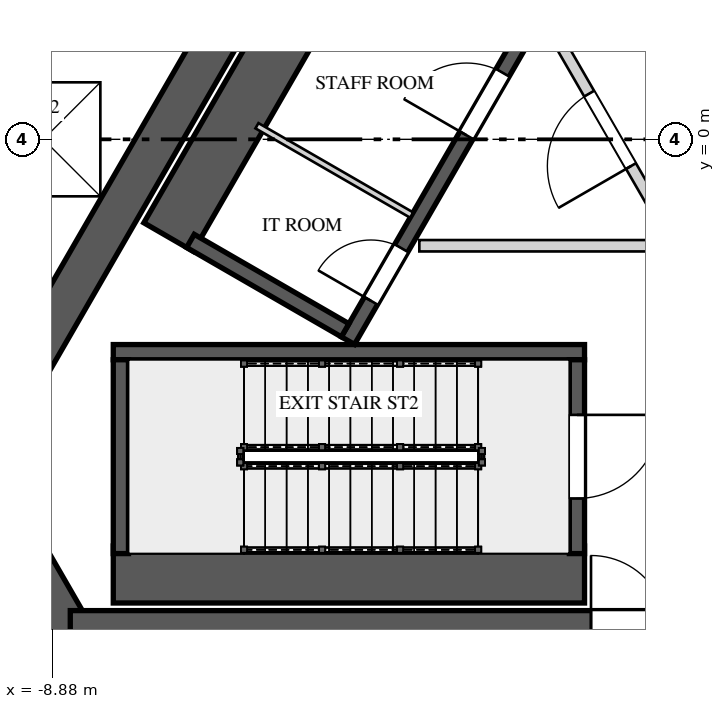
"""IFC4 building model, lengths in metres.
Left out: names, types, materials, properties, quantities, classifications, styles, units other than length and angle.
Written with IfcOpenShell. Run it as: python <this file> out.ifc"""

import sys

from ifc_helpers import new_model, si_unit, direction, frame, frame_2d, origin, origin_2d, place, context, subcontext, project, spatial, rectangle, extrude, element, fill, save


model = new_model("IFC4")
c1 = context("Model", 3, precision=1e-05, world=origin(), true_north=direction((0.0, 1.0)))
c2 = subcontext(c1, "Body", "Model", "MODEL_VIEW")
j1 = project(units=[si_unit("LENGTHUNIT", "METRE"), si_unit("PLANEANGLEUNIT", "RADIAN")], contexts=[c1])
p1 = place(None, origin())
s1 = spatial("IfcSite", under=j1, at=p1, CompositionType="ELEMENT")
p2 = place(p1, origin())
s2 = spatial("IfcBuilding", under=s1, at=p2, CompositionType="ELEMENT")
p3 = place(p2, frame((0.0, 0.0, 380.9)))
s3 = spatial("IfcBuildingStorey", under=s2, at=p3, CompositionType="ELEMENT", Elevation=380.9)
p4 = place(p3, frame((-1.285, 10.725, 0.0), z_axis=(0.0, 0.0, 1.0), x_axis=(-0.499994590896, -0.86602852671, 0.0)))
e1 = element("IfcWall", 1, at=p4, inside=s3, PredefinedType="SHEAR", context=c2, shape_type="SweptSolid", body=[
    extrude(rectangle(XDim=17.292, YDim=0.55, at=frame_2d((8.646, 0.0))), origin(), (0.0, 0.0, 1.0), 11.65),
])
p5 = place(p4, frame((6.851, 0.0, 0.0)))
e2 = element("IfcOpeningElement", 2, at=p5, cuts=e1, PredefinedType="OPENING", context=c2, shape_type="SweptSolid", body=[
    extrude(rectangle(XDim=1.0, YDim=2.4, at=frame_2d((0.5, 1.2))), frame((0.0, 0.285, 0.0), z_axis=(0.0, -1.0, 0.0), x_axis=(1.0, 0.0, 0.0)), (0.0, 0.0, 1.0), 0.57),
])
p6 = place(p3, frame((-10.01, -4.113, 0.0), z_axis=(0.0, 0.0, 1.0), x_axis=(0.499995765644, -0.866027848477, 0.0)))
e3 = element("IfcWall", 3, at=p6, inside=s3, PredefinedType="SHEAR", context=c2, shape_type="SweptSolid", body=[
    extrude(rectangle(XDim=2.887, YDim=0.55, at=frame_2d((1.443, 0.0))), origin(), (0.0, 0.0, 1.0), 11.65),
])
p7 = place(p3, frame((-8.646, -6.475, 0.0), z_axis=(0.0, 0.0, 1.0), x_axis=(1.0, 0.0, 0.0)))
e4 = element("IfcWall", 4, at=p7, inside=s3, PredefinedType="SHEAR", context=c2, shape_type="SweptSolid", body=[
    extrude(rectangle(XDim=17.292, YDim=0.55, at=frame_2d((8.646, 0.0))), origin(), (0.0, 0.0, 1.0), 11.65),
])
p8 = place(p7, frame((6.851, 0.0, 0.0)))
e5 = element("IfcOpeningElement", 5, at=p8, cuts=e4, PredefinedType="OPENING", context=c2, shape_type="SweptSolid", body=[
    extrude(rectangle(XDim=1.0, YDim=2.4, at=frame_2d((0.5, 1.2))), frame((0.0, 0.285, 0.0), z_axis=(0.0, -1.0, 0.0), x_axis=(1.0, 0.0, 0.0)), (0.0, 0.0, 1.0), 0.57),
])
p9 = place(p7, frame((15.089, 0.0, 0.0)))
e6 = element("IfcOpeningElement", 6, at=p9, cuts=e4, PredefinedType="OPENING", context=c2, shape_type="SweptSolid", body=[
    extrude(rectangle(XDim=0.8, YDim=2.1, at=frame_2d((0.4, 1.05))), frame((0.0, 0.285, 0.0), z_axis=(0.0, -1.0, 0.0), x_axis=(1.0, 0.0, 0.0)), (0.0, 0.0, 1.0), 0.57),
])
p10 = place(p3, frame((-24.801, 5.463, 0.0), z_axis=(0.0, 0.0, 1.0), x_axis=(0.669133322061, -0.74314238024, 0.0)))
e7 = element("IfcWall", 7, at=p10, inside=s3, PredefinedType="PARAPET", context=c2, shape_type="SweptSolid", body=[
    extrude(rectangle(XDim=41.439, YDim=0.45, at=frame_2d((20.72, 0.0))), origin(), (0.0, 0.0, 1.0), 1.2),
])
p11 = place(p3, frame((-8.08, -5.725, 0.0), z_axis=(0.0, 0.0, 1.0), x_axis=(1.0, 0.0, 0.0)))
e8 = element("IfcWall", 8, at=p11, inside=s3, PredefinedType="SOLIDWALL", context=c2, shape_type="SweptSolid", body=[
    extrude(rectangle(XDim=6.2, YDim=0.75, at=frame_2d((3.1, 0.0))), origin(), (0.0, 0.0, 1.0), 11.65),
])
p12 = place(p3, frame((-8.08, -2.8, 0.0), z_axis=(0.0, 0.0, 1.0), x_axis=(1.0, 0.0, 0.0)))
e9 = element("IfcWall", 9, at=p12, inside=s3, PredefinedType="SOLIDWALL", context=c2, shape_type="SweptSolid", body=[
    extrude(rectangle(XDim=6.2, YDim=0.2, at=frame_2d((3.1, 0.0))), origin(), (0.0, 0.0, 1.0), 11.65),
])
p13 = place(p3, frame((-7.98, -2.9, 0.0), z_axis=(0.0, 0.0, 1.0), x_axis=(0.0, -1.0, 0.0)))
e10 = element("IfcWall", 10, at=p13, inside=s3, PredefinedType="SOLIDWALL", context=c2, shape_type="SweptSolid", body=[
    extrude(rectangle(XDim=2.55, YDim=0.2, at=frame_2d((1.275, 0.0))), origin(), (0.0, 0.0, 1.0), 11.65),
])
p14 = place(p3, frame((-1.98, -2.9, 0.0), z_axis=(0.0, 0.0, 1.0), x_axis=(0.0, -1.0, 0.0)))
e11 = element("IfcWall", 11, at=p14, inside=s3, PredefinedType="SOLIDWALL", context=c2, shape_type="SweptSolid", body=[
    extrude(rectangle(XDim=2.55, YDim=0.2, at=frame_2d((1.275, 0.0))), origin(), (0.0, 0.0, 1.0), 11.65),
])
p15 = place(p14, frame((0.725, 0.0, 0.0)))
e12 = element("IfcOpeningElement", 12, at=p15, cuts=e11, PredefinedType="OPENING", context=c2, shape_type="SweptSolid", body=[
    extrude(rectangle(XDim=1.1, YDim=2.4, at=frame_2d((0.55, 1.2))), frame((0.0, 0.11, 0.0), z_axis=(0.0, -1.0, 0.0), x_axis=(1.0, 0.0, 0.0)), (0.0, 0.0, 1.0), 0.22),
])
p16 = place(p3, frame((-4.993, -2.648, 0.0), z_axis=(0.0, 0.0, 1.0), x_axis=(0.499996545922, 0.866027397988, 0.0)))
e13 = element("IfcWall", 13, at=p16, inside=s3, PredefinedType="SOLIDWALL", context=c2, shape_type="SweptSolid", body=[
    extrude(rectangle(XDim=5.5, YDim=0.2, at=frame_2d((2.75, 0.0))), origin(), (0.0, 0.0, 1.0), 11.65),
])
p17 = place(p16, frame((3.12, 0.0, 0.0)))
e14 = element("IfcOpeningElement", 14, at=p17, cuts=e13, PredefinedType="OPENING", context=c2, shape_type="SweptSolid", body=[
    extrude(rectangle(XDim=0.95, YDim=2.4, at=frame_2d((0.475, 1.2))), frame((0.0, 0.11, 0.0), z_axis=(0.0, -1.0, 0.0), x_axis=(1.0, 0.0, 0.0)), (0.0, 0.0, 1.0), 0.22),
])
p18 = place(p16, frame((0.605, 0.0, 0.0)))
e15 = element("IfcOpeningElement", 15, at=p18, cuts=e13, PredefinedType="OPENING", context=c2, shape_type="SweptSolid", body=[
    extrude(rectangle(XDim=0.8, YDim=2.1, at=frame_2d((0.4, 1.05))), frame((0.0, 0.11, 0.0), z_axis=(0.0, -1.0, 0.0), x_axis=(1.0, 0.0, 0.0)), (0.0, 0.0, 1.0), 0.22),
])
p19 = place(p3, frame((-4.603, 3.477, 0.0), z_axis=(0.0, 0.0, 1.0), x_axis=(-0.500015767406, -0.866016300277, 0.0)))
e16 = element("IfcWall", 16, at=p19, inside=s3, PredefinedType="SOLIDWALL", context=c2, shape_type="SweptSolid", body=[
    extrude(rectangle(XDim=5.5, YDim=0.75, at=frame_2d((2.75, 0.0))), origin(), (0.0, 0.0, 1.0), 11.65),
])
p20 = place(p3, frame((-5.03, -2.512, 0.0), z_axis=(0.0, 0.0, 1.0), x_axis=(-0.866016039709, 0.500016218704, 0.0)))
e17 = element("IfcWall", 17, at=p20, inside=s3, PredefinedType="SOLIDWALL", context=c2, shape_type="SweptSolid", body=[
    extrude(rectangle(XDim=2.35, YDim=0.2, at=frame_2d((1.175, 0.0))), origin(), (0.0, 0.0, 1.0), 11.65),
])
p21 = place(p3, frame((-4.155, -0.996, 0.0), z_axis=(0.0, 0.0, 1.0), x_axis=(-0.866016039709, 0.500016218704, 0.0)))
e18 = element("IfcWall", 18, at=p21, inside=s3, PredefinedType="PARTITIONING", context=c2, shape_type="SweptSolid", body=[
    extrude(rectangle(XDim=2.35, YDim=0.08, at=frame_2d((1.175, 0.0))), origin(), (0.0, 0.0, 1.0), 11.65),
])
p22 = place(p3, frame((-0.744, -1.261, 0.0), z_axis=(0.0, 0.0, 1.0), x_axis=(-0.500004234368, 0.866022959057, 0.0)))
e19 = element("IfcWall", 19, at=p22, inside=s3, PredefinedType="PARTITIONING", context=c2, shape_type="SweptSolid", body=[
    extrude(rectangle(XDim=3.125, YDim=0.15, at=frame_2d((1.562, 0.0))), origin(), (0.0, 0.0, 1.0), 11.65),
])
p23 = place(p22, frame((1.05, 0.0, 0.0)))
e20 = element("IfcOpeningElement", 20, at=p23, cuts=e19, PredefinedType="OPENING", context=c2, shape_type="SweptSolid", body=[
    extrude(rectangle(XDim=1.1, YDim=2.4, at=frame_2d((0.55, 1.2))), frame((0.0, 0.085, 0.0), z_axis=(0.0, -1.0, 0.0), x_axis=(1.0, 0.0, 0.0)), (0.0, 0.0, 1.0), 0.17),
])
p24 = place(p3, frame((-4.053, -1.4, 0.0), z_axis=(0.0, 0.0, 1.0), x_axis=(1.0, 0.0, 0.0)))
e21 = element("IfcWall", 21, at=p24, inside=s3, PredefinedType="PARTITIONING", context=c2, shape_type="SweptSolid", body=[
    extrude(rectangle(XDim=7.876, YDim=0.15, at=frame_2d((3.938, 0.0))), origin(), (0.0, 0.0, 1.0), 11.65),
])
p25 = place(p2, frame((0.0, 0.0, 392.9)))
p26 = place(p25, frame((-1.23, -2.9, 0.0), z_axis=(0.0, 0.0, 1.0), x_axis=(0.0, -1.0, 0.0)))
p27 = place(p26, frame((0.675, 0.0, 0.0)))
p28 = place(p27, origin())
e22 = element("IfcDoor", 22, at=p28, inside=s3, OperationType="DOUBLE_DOOR_SINGLE_SWING", PredefinedType="DOOR", context=c2, shape_type="SweptSolid", body=[
    extrude(rectangle(XDim=1.2, YDim=2.1, at=frame_2d((0.6, 1.05))), frame((0.0, 0.025, 0.0), z_axis=(0.0, -1.0, 0.0), x_axis=(1.0, 0.0, 0.0)), (0.0, 0.0, 1.0), 0.05),
])
p29 = place(p25, frame((0.0, 0.0, -0.35)))
p30 = place(p29, frame((-9.0, 0.0, 0.0)))
p31 = place(p30, frame((0.0, 0.0, 0.3)))
e23 = element("IfcWindow", 23, at=p31, inside=s3, PartitioningType="SINGLE_PANEL", PredefinedType="SKYLIGHT", context=c2, shape_type="SweptSolid", body=[
    extrude(rectangle(XDim=1.5, YDim=1.5, at=origin_2d()), origin(), (0.0, 0.0, 1.0), 0.05),
])
p32 = place(p15, origin())
e24 = element("IfcDoor", 24, at=p32, inside=s3, OperationType="SINGLE_SWING_LEFT", PredefinedType="DOOR", context=c2, shape_type="SweptSolid", body=[
    extrude(rectangle(XDim=1.1, YDim=2.4, at=frame_2d((0.55, 1.2))), frame((0.0, 0.025, 0.0), z_axis=(0.0, -1.0, 0.0), x_axis=(1.0, 0.0, 0.0)), (0.0, 0.0, 1.0), 0.05),
])
fill(e12, e24)
p33 = place(p17, origin())
e25 = element("IfcDoor", 25, at=p33, inside=s3, OperationType="SINGLE_SWING_LEFT", PredefinedType="DOOR", context=c2, shape_type="SweptSolid", body=[
    extrude(rectangle(XDim=0.95, YDim=2.4, at=frame_2d((0.475, 1.2))), frame((0.0, 0.025, 0.0), z_axis=(0.0, -1.0, 0.0), x_axis=(1.0, 0.0, 0.0)), (0.0, 0.0, 1.0), 0.05),
])
fill(e14, e25)
p34 = place(p18, origin())
e26 = element("IfcDoor", 26, at=p34, inside=s3, OperationType="SINGLE_SWING_RIGHT", PredefinedType="DOOR", context=c2, shape_type="SweptSolid", body=[
    extrude(rectangle(XDim=0.8, YDim=2.1, at=frame_2d((0.4, 1.05))), frame((0.0, 0.025, 0.0), z_axis=(0.0, -1.0, 0.0), x_axis=(1.0, 0.0, 0.0)), (0.0, 0.0, 1.0), 0.05),
])
fill(e15, e26)
p35 = place(p23, origin())
e27 = element("IfcDoor", 27, at=p35, inside=s3, OperationType="SINGLE_SWING_LEFT", PredefinedType="DOOR", context=c2, shape_type="SweptSolid", body=[
    extrude(rectangle(XDim=1.1, YDim=2.4, at=frame_2d((0.55, 1.2))), frame((0.0, 0.025, 0.0), z_axis=(0.0, -1.0, 0.0), x_axis=(1.0, 0.0, 0.0)), (0.0, 0.0, 1.0), 0.05),
])
fill(e20, e27)
save(model, sys.argv[1])
